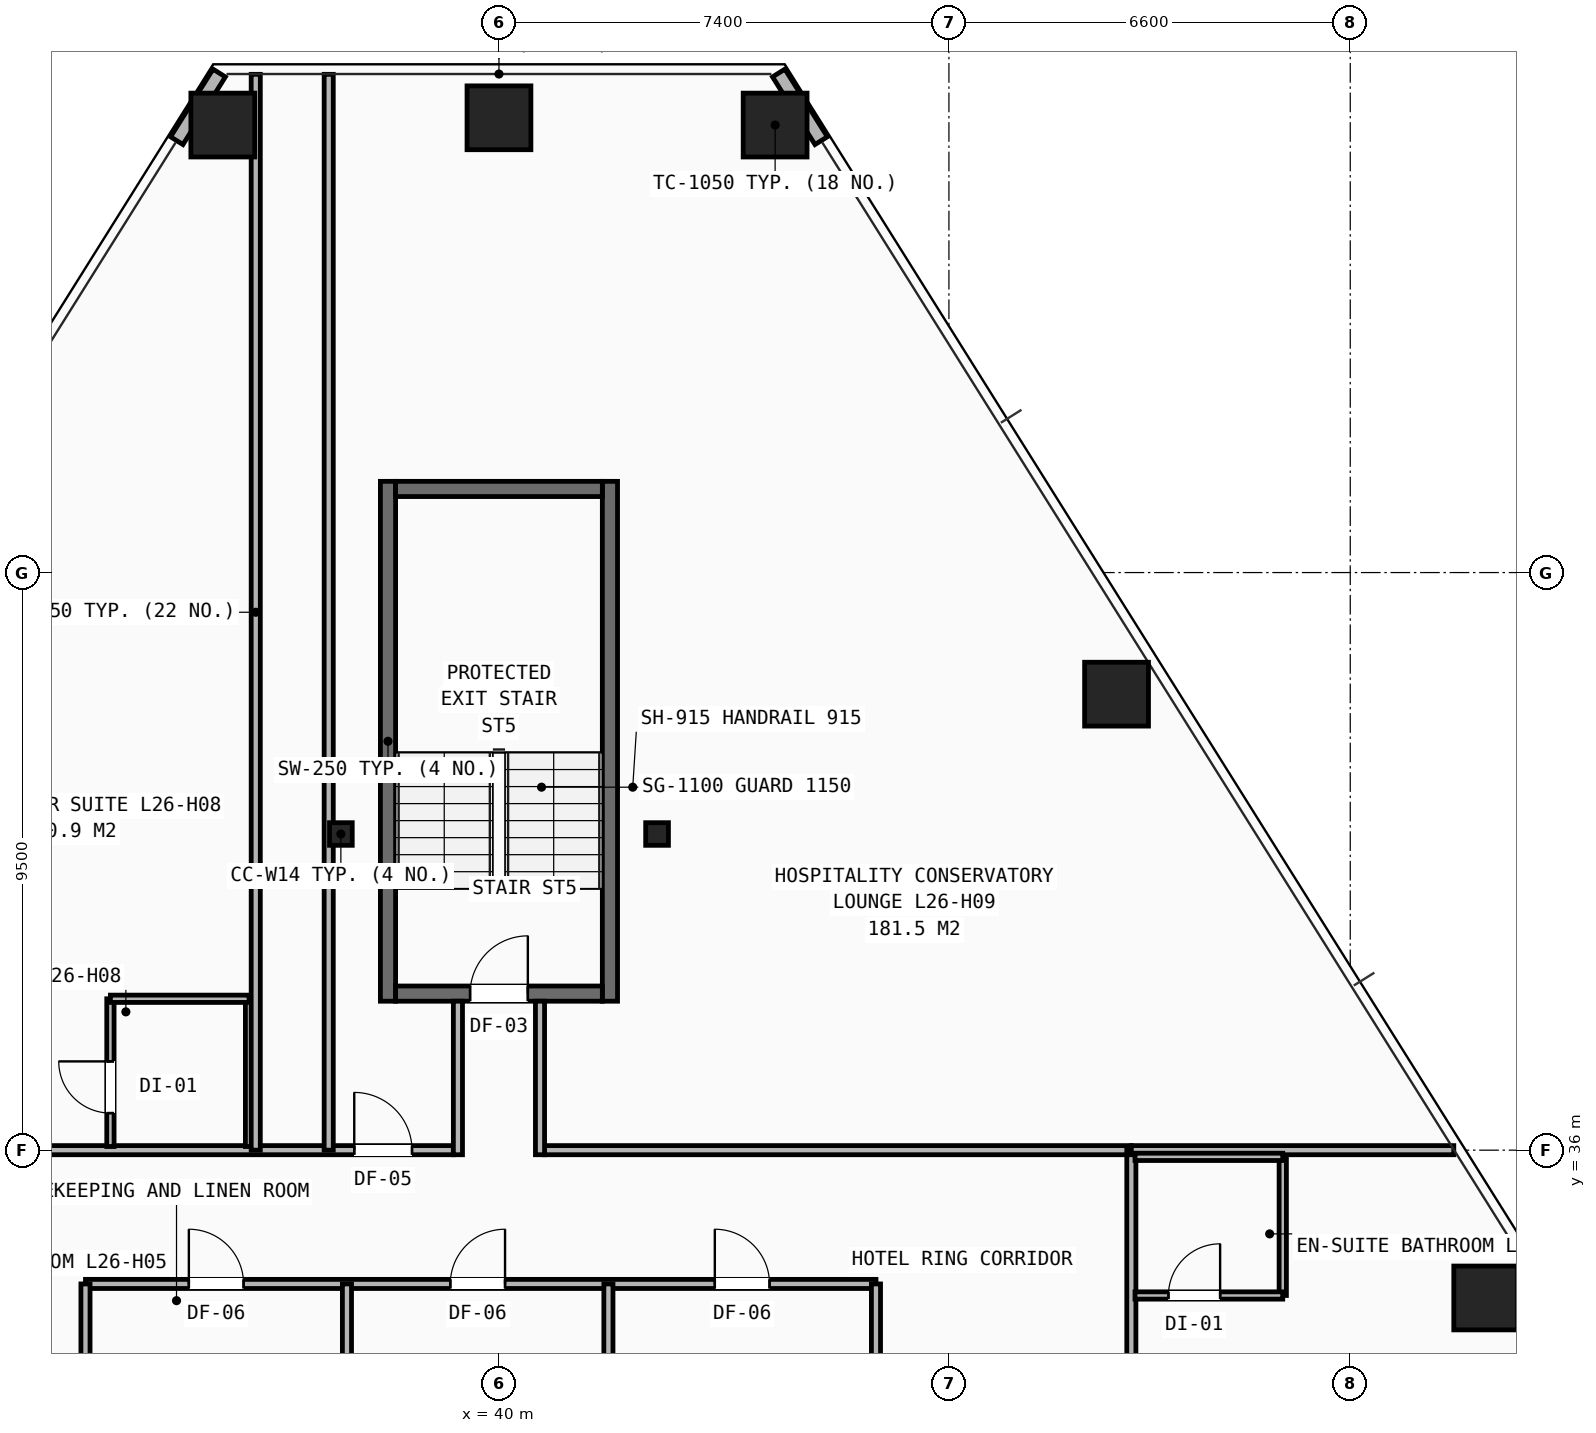
"""IFC4 building model, lengths in metres.
Left out: names, types, materials, properties, quantities, classifications, styles, units other than length and angle.
Written with IfcOpenShell. Run it as: python <this file> out.ifc"""

import sys

from ifc_helpers import new_model, si_unit, direction, frame, frame_2d, origin, origin_2d, place, context, subcontext, project, spatial, rectangle, hollow_rectangle, i_section, extrude, element, fill, save


model = new_model("IFC4")
c1 = context("Model", 3, precision=1e-05, world=origin(), true_north=direction((0.0, 1.0)))
c2 = subcontext(c1, "Body", "Model", "MODEL_VIEW")
j1 = project(units=[si_unit("LENGTHUNIT", "METRE"), si_unit("PLANEANGLEUNIT", "RADIAN")], contexts=[c1])
p1 = place(None, origin())
s1 = spatial("IfcSite", under=j1, at=p1, CompositionType="ELEMENT")
p2 = place(p1, origin())
s2 = spatial("IfcBuilding", under=s1, at=p2, CompositionType="ELEMENT")
p3 = place(p2, frame((0.0, 0.0, 92.6)))
s3 = spatial("IfcBuildingStorey", under=s2, at=p3, CompositionType="ELEMENT", Elevation=92.6)
for number, where, z_axis, x_axis in (
    (1, (37.4, 41.2, 0.0), (0.0, 0.0, 1.0), (1.0, 0.0, 0.0)),
    (2, (42.6, 41.2, 0.0), (0.0, 0.0, 1.0), (1.0, 0.0, 0.0)),
):
    element("IfcColumn", number, at=place(p3, frame(where, z_axis=z_axis, x_axis=x_axis)), inside=s3, PredefinedType="COLUMN", context=c2, shape_type="SweptSolid", body=[
        extrude(i_section(OverallWidth=0.374, OverallDepth=0.372, WebThickness=0.016, FlangeThickness=0.026, at=origin_2d()), origin(), (0.0, 0.0, 1.0), 3.2),
    ])
for number, where, z_axis, x_axis in (
    (3, (44.542, 52.86, 0.0), (0.0, 0.0, 1.0), (1.0, 0.0, 0.0)),
    (4, (40.0, 52.979, 0.0), (0.0, 0.0, 1.0), (1.0, 0.0, 0.0)),
    (5, (35.458, 52.86, 0.0), (0.0, 0.0, 1.0), (1.0, 0.0, 0.0)),
    (6, (56.228, 33.569, 0.0), (0.0, 0.0, 1.0), (1.0, 0.0, 0.0)),
    (7, (50.156, 43.5, 0.0), (0.0, 0.0, 1.0), (1.0, 0.0, 0.0)),
):
    element("IfcColumn", number, at=place(p3, frame(where, z_axis=z_axis, x_axis=x_axis)), inside=s3, PredefinedType="COLUMN", context=c2, shape_type="SweptSolid", body=[
        extrude(hollow_rectangle(XDim=1.05, YDim=1.05, WallThickness=0.07, at=origin_2d()), origin(), (0.0, 0.0, 1.0), 3.2),
    ])
for number, where, z_axis, x_axis in (
    (8, (35.399, 53.716, 0.0), (0.0, 0.0, 1.0), (-0.531, -0.847, 0.0)),
    (9, (45.299, 52.603, 0.0), (0.0, 0.0, 1.0), (-0.531, 0.847, 0.0)),
):
    element("IfcWall", number, at=place(p3, frame(where, z_axis=z_axis, x_axis=x_axis)), inside=s3, PredefinedType="SHEAR", context=c2, shape_type="SweptSolid", body=[
        extrude(rectangle(XDim=1.313, YDim=0.24, at=frame_2d((0.657, 0.0))), origin(), (0.0, 0.0, 1.0), 2.253),
    ])
p4 = place(p3, frame((33.2, 33.8, 0.0), z_axis=(0.0, 0.0, 1.0), x_axis=(1.0, 0.0, 0.0)))
e10 = element("IfcWall", 10, at=p4, inside=s3, PredefinedType="PARTITIONING", context=c2, shape_type="SweptSolid", body=[
    extrude(rectangle(XDim=13.0, YDim=0.15, at=frame_2d((6.5, 0.0))), origin(), (0.0, 0.0, 1.0), 2.97),
])
p5 = place(p4, frame((1.7, 0.0, 0.0)))
e11 = element("IfcOpeningElement", 11, at=p5, cuts=e10, PredefinedType="OPENING", context=c2, shape_type="SweptSolid", body=[
    extrude(rectangle(XDim=0.9, YDim=2.1, at=frame_2d((0.45, 1.05))), frame((0.0, 0.085, 0.0), z_axis=(0.0, -1.0, 0.0), x_axis=(1.0, 0.0, 0.0)), (0.0, 0.0, 1.0), 0.17),
])
p6 = place(p4, frame((6.0, 0.0, 0.0)))
e12 = element("IfcOpeningElement", 12, at=p6, cuts=e10, PredefinedType="OPENING", context=c2, shape_type="SweptSolid", body=[
    extrude(rectangle(XDim=0.9, YDim=2.1, at=frame_2d((0.45, 1.05))), frame((0.0, 0.085, 0.0), z_axis=(0.0, -1.0, 0.0), x_axis=(1.0, 0.0, 0.0)), (0.0, 0.0, 1.0), 0.17),
])
p7 = place(p4, frame((10.35, 0.0, 0.0)))
e13 = element("IfcOpeningElement", 13, at=p7, cuts=e10, PredefinedType="OPENING", context=c2, shape_type="SweptSolid", body=[
    extrude(rectangle(XDim=0.9, YDim=2.1, at=frame_2d((0.45, 1.05))), frame((0.0, 0.085, 0.0), z_axis=(0.0, -1.0, 0.0), x_axis=(1.0, 0.0, 0.0)), (0.0, 0.0, 1.0), 0.17),
])
for number, where, z_axis, x_axis in (
    (14, (33.2, 31.2, 0.0), (0.0, 0.0, 1.0), (0.0, 1.0, 0.0)),
    (15, (46.2, 31.2, 0.0), (0.0, 0.0, 1.0), (0.0, 1.0, 0.0)),
    (16, (37.5, 31.2, 0.0), (0.0, 0.0, 1.0), (0.0, 1.0, 0.0)),
    (17, (41.8, 31.2, 0.0), (0.0, 0.0, 1.0), (0.0, 1.0, 0.0)),
):
    element("IfcWall", number, at=place(p3, frame(where, z_axis=z_axis, x_axis=x_axis)), inside=s3, PredefinedType="PARTITIONING", context=c2, shape_type="SweptSolid", body=[
        extrude(rectangle(XDim=2.6, YDim=0.15, at=frame_2d((1.3, 0.0))), origin(), (0.0, 0.0, 1.0), 2.421),
    ])
p8 = place(p3, frame((29.6, 36.0, 0.0), z_axis=(0.0, 0.0, 1.0), x_axis=(1.0, 0.0, 0.0)))
e18 = element("IfcWall", 18, at=p8, inside=s3, PredefinedType="PARTITIONING", context=c2, shape_type="SweptSolid", body=[
    extrude(rectangle(XDim=9.65, YDim=0.15, at=frame_2d((4.825, 0.0))), origin(), (0.0, 0.0, 1.0), 2.503),
])
p9 = place(p8, frame((0.57, 0.0, 0.0)))
e19 = element("IfcOpeningElement", 19, at=p9, cuts=e18, PredefinedType="OPENING", context=c2, shape_type="SweptSolid", body=[
    extrude(rectangle(XDim=0.95, YDim=2.1, at=frame_2d((0.475, 1.05))), frame((0.0, 0.085, 0.0), z_axis=(0.0, -1.0, 0.0), x_axis=(1.0, 0.0, 0.0)), (0.0, 0.0, 1.0), 0.17),
])
p10 = place(p8, frame((8.02, 0.0, 0.0)))
e20 = element("IfcOpeningElement", 20, at=p10, cuts=e18, PredefinedType="OPENING", context=c2, shape_type="SweptSolid", body=[
    extrude(rectangle(XDim=0.95, YDim=2.1, at=frame_2d((0.475, 1.05))), frame((0.0, 0.085, 0.0), z_axis=(0.0, -1.0, 0.0), x_axis=(1.0, 0.0, 0.0)), (0.0, 0.0, 1.0), 0.17),
])
p11 = place(p3, frame((40.75, 36.0, 0.0), z_axis=(0.0, 0.0, 1.0), x_axis=(1.0, 0.0, 0.0)))
e21 = element("IfcWall", 21, at=p11, inside=s3, PredefinedType="PARTITIONING", context=c2, shape_type="SweptSolid", body=[
    extrude(rectangle(XDim=9.65, YDim=0.15, at=frame_2d((4.825, 0.0))), origin(), (0.0, 0.0, 1.0), 2.503),
])
p12 = place(p3, frame((50.4, 14.1, 0.0), z_axis=(0.0, 0.0, 1.0), x_axis=(0.0, 1.0, 0.0)))
e22 = element("IfcWall", 22, at=p12, inside=s3, PredefinedType="PARTITIONING", context=c2, shape_type="SweptSolid", body=[
    extrude(rectangle(XDim=21.9, YDim=0.15, at=frame_2d((10.95, 0.0))), origin(), (0.0, 0.0, 1.0), 2.421),
])
p13 = place(p12, frame((0.42, 0.0, 0.0)))
e23 = element("IfcOpeningElement", 23, at=p13, cuts=e22, PredefinedType="OPENING", context=c2, shape_type="SweptSolid", body=[
    extrude(rectangle(XDim=0.95, YDim=2.1, at=frame_2d((0.475, 1.05))), frame((0.0, 0.085, 0.0), z_axis=(0.0, -1.0, 0.0), x_axis=(1.0, 0.0, 0.0)), (0.0, 0.0, 1.0), 0.17),
])
p14 = place(p12, frame((10.82, 0.0, 0.0)))
e24 = element("IfcOpeningElement", 24, at=p14, cuts=e22, PredefinedType="OPENING", context=c2, shape_type="SweptSolid", body=[
    extrude(rectangle(XDim=0.95, YDim=2.1, at=frame_2d((0.475, 1.05))), frame((0.0, 0.085, 0.0), z_axis=(0.0, -1.0, 0.0), x_axis=(1.0, 0.0, 0.0)), (0.0, 0.0, 1.0), 0.17),
])
p15 = place(p3, frame((50.4, 36.0, 0.0), z_axis=(0.0, 0.0, 1.0), x_axis=(1.0, 0.0, 0.0)))
e25 = element("IfcWall", 25, at=p15, inside=s3, PredefinedType="PARTITIONING", context=c2, shape_type="SweptSolid", body=[
    extrude(rectangle(XDim=5.303, YDim=0.15, at=frame_2d((2.651, 0.0))), origin(), (0.0, 0.0, 1.0), 2.258),
])
p16 = place(p3, frame((52.89, 33.61, 0.0), z_axis=(0.0, 0.0, 1.0), x_axis=(0.0, 1.0, 0.0)))
e26 = element("IfcWall", 26, at=p16, inside=s3, PredefinedType="PARTITIONING", context=c2, shape_type="SweptSolid", body=[
    extrude(rectangle(XDim=2.28, YDim=0.12, at=frame_2d((1.14, 0.0))), origin(), (0.0, 0.0, 1.0), 2.97),
])
p17 = place(p3, frame((50.46, 33.61, 0.0), z_axis=(0.0, 0.0, 1.0), x_axis=(1.0, 0.0, 0.0)))
e27 = element("IfcWall", 27, at=p17, inside=s3, PredefinedType="PARTITIONING", context=c2, shape_type="SweptSolid", body=[
    extrude(rectangle(XDim=2.43, YDim=0.12, at=frame_2d((1.215, 0.0))), origin(), (0.0, 0.0, 1.0), 2.503),
])
p18 = place(p17, frame((0.55, 0.0, 0.0)))
e28 = element("IfcOpeningElement", 28, at=p18, cuts=e27, PredefinedType="OPENING", context=c2, shape_type="SweptSolid", body=[
    extrude(rectangle(XDim=0.85, YDim=2.05, at=frame_2d((0.425, 1.025))), frame((0.0, 0.07, 0.0), z_axis=(0.0, -1.0, 0.0), x_axis=(1.0, 0.0, 0.0)), (0.0, 0.0, 1.0), 0.14),
])
p19 = place(p3, frame((50.46, 35.89, 0.0), z_axis=(0.0, 0.0, 1.0), x_axis=(1.0, 0.0, 0.0)))
e29 = element("IfcWall", 29, at=p19, inside=s3, PredefinedType="PARTITIONING", context=c2, shape_type="SweptSolid", body=[
    extrude(rectangle(XDim=2.43, YDim=0.12, at=frame_2d((1.215, 0.0))), origin(), (0.0, 0.0, 1.0), 2.97),
])
p20 = place(p3, frame((33.61, 36.06, 0.0), z_axis=(0.0, 0.0, 1.0), x_axis=(0.0, 1.0, 0.0)))
e30 = element("IfcWall", 30, at=p20, inside=s3, PredefinedType="PARTITIONING", context=c2, shape_type="SweptSolid", body=[
    extrude(rectangle(XDim=2.43, YDim=0.12, at=frame_2d((1.215, 0.0))), origin(), (0.0, 0.0, 1.0), 2.97),
])
p21 = place(p20, frame((0.55, 0.0, 0.0)))
e31 = element("IfcOpeningElement", 31, at=p21, cuts=e30, PredefinedType="OPENING", context=c2, shape_type="SweptSolid", body=[
    extrude(rectangle(XDim=0.85, YDim=2.05, at=frame_2d((0.425, 1.025))), frame((0.0, 0.07, 0.0), z_axis=(0.0, -1.0, 0.0), x_axis=(1.0, 0.0, 0.0)), (0.0, 0.0, 1.0), 0.14),
])
p22 = place(p3, frame((35.89, 36.06, 0.0), z_axis=(0.0, 0.0, 1.0), x_axis=(0.0, 1.0, 0.0)))
e32 = element("IfcWall", 32, at=p22, inside=s3, PredefinedType="PARTITIONING", context=c2, shape_type="SweptSolid", body=[
    extrude(rectangle(XDim=2.43, YDim=0.12, at=frame_2d((1.215, 0.0))), origin(), (0.0, 0.0, 1.0), 2.97),
])
p23 = place(p3, frame((33.61, 38.49, 0.0), z_axis=(0.0, 0.0, 1.0), x_axis=(1.0, 0.0, 0.0)))
e33 = element("IfcWall", 33, at=p23, inside=s3, PredefinedType="PARTITIONING", context=c2, shape_type="SweptSolid", body=[
    extrude(rectangle(XDim=2.28, YDim=0.12, at=frame_2d((1.14, 0.0))), origin(), (0.0, 0.0, 1.0), 2.97),
])
for number, where, z_axis, x_axis in (
    (34, (36.0, 36.0, 0.0), (0.0, 0.0, 1.0), (0.0, 1.0, 0.0)),
    (35, (37.2, 36.0, 0.0), (0.0, 0.0, 1.0), (0.0, 1.0, 0.0)),
):
    element("IfcWall", number, at=place(p3, frame(where, z_axis=z_axis, x_axis=x_axis)), inside=s3, PredefinedType="PARTITIONING", context=c2, shape_type="SweptSolid", body=[
        extrude(rectangle(XDim=17.694, YDim=0.15, at=frame_2d((8.847, 0.0))), origin(), (0.0, 0.0, 1.0), 2.258),
    ])
for number, where, z_axis, x_axis in (
    (36, (38.175, 38.45, 0.0), (0.0, 0.0, 1.0), (0.0, 1.0, 0.0)),
    (37, (41.825, 38.45, 0.0), (0.0, 0.0, 1.0), (0.0, 1.0, 0.0)),
):
    element("IfcWall", number, at=place(p3, frame(where, z_axis=z_axis, x_axis=x_axis)), inside=s3, PredefinedType="SHEAR", context=c2, shape_type="SweptSolid", body=[
        extrude(rectangle(XDim=8.55, YDim=0.25, at=frame_2d((4.275, 0.0))), origin(), (0.0, 0.0, 1.0), 2.97),
    ])
p24 = place(p3, frame((38.3, 38.575, 0.0), z_axis=(0.0, 0.0, 1.0), x_axis=(1.0, 0.0, 0.0)))
e38 = element("IfcWall", 38, at=p24, inside=s3, PredefinedType="SHEAR", context=c2, shape_type="SweptSolid", body=[
    extrude(rectangle(XDim=3.4, YDim=0.25, at=frame_2d((1.7, 0.0))), origin(), (0.0, 0.0, 1.0), 2.97),
])
p25 = place(p24, frame((1.225, 0.0, 0.0)))
e39 = element("IfcOpeningElement", 39, at=p25, cuts=e38, PredefinedType="OPENING", context=c2, shape_type="SweptSolid", body=[
    extrude(rectangle(XDim=0.95, YDim=2.1, at=frame_2d((0.475, 1.05))), frame((0.0, 0.135, 0.0), z_axis=(0.0, -1.0, 0.0), x_axis=(1.0, 0.0, 0.0)), (0.0, 0.0, 1.0), 0.27),
])
p26 = place(p3, frame((38.3, 46.875, 0.0), z_axis=(0.0, 0.0, 1.0), x_axis=(1.0, 0.0, 0.0)))
e40 = element("IfcWall", 40, at=p26, inside=s3, PredefinedType="SHEAR", context=c2, shape_type="SweptSolid", body=[
    extrude(rectangle(XDim=3.4, YDim=0.25, at=frame_2d((1.7, 0.0))), origin(), (0.0, 0.0, 1.0), 2.97),
])
for number, where, z_axis, x_axis in (
    (41, (39.325, 35.925, 0.0), (0.0, 0.0, 1.0), (0.0, 1.0, 0.0)),
    (42, (40.675, 35.925, 0.0), (0.0, 0.0, 1.0), (0.0, 1.0, 0.0)),
):
    element("IfcWall", number, at=place(p3, frame(where, z_axis=z_axis, x_axis=x_axis)), inside=s3, PredefinedType="PARTITIONING", context=c2, shape_type="SweptSolid", body=[
        extrude(rectangle(XDim=2.525, YDim=0.15, at=frame_2d((1.262, 0.0))), origin(), (0.0, 0.0, 1.0), 2.97),
    ])
p27 = place(p5, origin())
e43 = element("IfcDoor", 43, at=p27, inside=s3, OperationType="SINGLE_SWING_LEFT", PredefinedType="DOOR", context=c2, shape_type="SweptSolid", body=[
    extrude(rectangle(XDim=0.9, YDim=2.1, at=frame_2d((0.45, 1.05))), frame((0.0, 0.025, 0.0), z_axis=(0.0, -1.0, 0.0), x_axis=(1.0, 0.0, 0.0)), (0.0, 0.0, 1.0), 0.05),
])
fill(e11, e43)
p28 = place(p6, origin())
e44 = element("IfcDoor", 44, at=p28, inside=s3, OperationType="SINGLE_SWING_RIGHT", PredefinedType="DOOR", context=c2, shape_type="SweptSolid", body=[
    extrude(rectangle(XDim=0.9, YDim=2.1, at=frame_2d((0.45, 1.05))), frame((0.0, 0.025, 0.0), z_axis=(0.0, -1.0, 0.0), x_axis=(1.0, 0.0, 0.0)), (0.0, 0.0, 1.0), 0.05),
])
fill(e12, e44)
p29 = place(p7, origin())
e45 = element("IfcDoor", 45, at=p29, inside=s3, OperationType="SINGLE_SWING_LEFT", PredefinedType="DOOR", context=c2, shape_type="SweptSolid", body=[
    extrude(rectangle(XDim=0.9, YDim=2.1, at=frame_2d((0.45, 1.05))), frame((0.0, 0.025, 0.0), z_axis=(0.0, -1.0, 0.0), x_axis=(1.0, 0.0, 0.0)), (0.0, 0.0, 1.0), 0.05),
])
fill(e13, e45)
p30 = place(p18, origin())
e46 = element("IfcDoor", 46, at=p30, inside=s3, OperationType="SINGLE_SWING_RIGHT", PredefinedType="DOOR", context=c2, shape_type="SweptSolid", body=[
    extrude(rectangle(XDim=0.85, YDim=2.05, at=frame_2d((0.425, 1.025))), frame((0.0, 0.025, 0.0), z_axis=(0.0, -1.0, 0.0), x_axis=(1.0, 0.0, 0.0)), (0.0, 0.0, 1.0), 0.05),
])
fill(e28, e46)
p31 = place(p21, origin())
e47 = element("IfcDoor", 47, at=p31, inside=s3, OperationType="SINGLE_SWING_RIGHT", PredefinedType="DOOR", context=c2, shape_type="SweptSolid", body=[
    extrude(rectangle(XDim=0.85, YDim=2.05, at=frame_2d((0.425, 1.025))), frame((0.0, 0.025, 0.0), z_axis=(0.0, -1.0, 0.0), x_axis=(1.0, 0.0, 0.0)), (0.0, 0.0, 1.0), 0.05),
])
fill(e31, e47)
p32 = place(p10, origin())
e48 = element("IfcDoor", 48, at=p32, inside=s3, OperationType="SINGLE_SWING_LEFT", PredefinedType="DOOR", context=c2, shape_type="SweptSolid", body=[
    extrude(rectangle(XDim=0.95, YDim=2.1, at=frame_2d((0.475, 1.05))), frame((0.0, 0.025, 0.0), z_axis=(0.0, -1.0, 0.0), x_axis=(1.0, 0.0, 0.0)), (0.0, 0.0, 1.0), 0.05),
])
fill(e20, e48)
p33 = place(p25, origin())
e49 = element("IfcDoor", 49, at=p33, inside=s3, OperationType="SINGLE_SWING_RIGHT", PredefinedType="DOOR", context=c2, shape_type="SweptSolid", body=[
    extrude(rectangle(XDim=0.95, YDim=2.1, at=frame_2d((0.475, 1.05))), frame((0.0, 0.025, 0.0), z_axis=(0.0, -1.0, 0.0), x_axis=(1.0, 0.0, 0.0)), (0.0, 0.0, 1.0), 0.05),
])
fill(e39, e49)
save(model, sys.argv[1])
